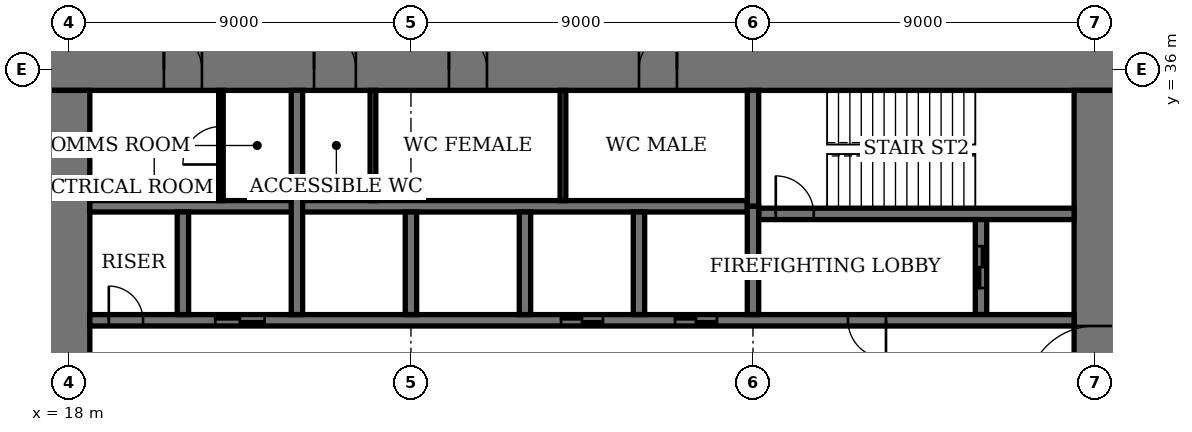
"""IFC4 building model, lengths in metres.
Left out: names, types, materials, properties, quantities, classifications, styles, units other than length and angle.
Written with IfcOpenShell. Run it as: python <this file> out.ifc"""

import sys

from ifc_helpers import new_model, si_unit, direction, frame, frame_2d, origin, place, context, subcontext, project, spatial, rectangle, extrude, element, fill, save


model = new_model("IFC4")
c1 = context("Model", 3, precision=1e-05, world=origin(), true_north=direction((0.0, 1.0)))
c2 = subcontext(c1, "Body", "Model", "MODEL_VIEW")
j1 = project(units=[si_unit("LENGTHUNIT", "METRE"), si_unit("PLANEANGLEUNIT", "RADIAN")], contexts=[c1])
p1 = place(None, origin())
s1 = spatial("IfcSite", under=j1, at=p1, CompositionType="ELEMENT")
p2 = place(p1, origin())
s2 = spatial("IfcBuilding", under=s1, at=p2, CompositionType="ELEMENT")
p3 = place(p2, frame((0.0, 0.0, 85.0)))
s3 = spatial("IfcBuildingStorey", under=s2, at=p3, CompositionType="ELEMENT", Elevation=85.0)
p4 = place(p3, frame((45.55, 36.0, 0.0), z_axis=(0.0, 0.0, 1.0), x_axis=(-1.0, 0.0, 0.0)))
e1 = element("IfcWall", 1, at=p4, inside=s3, PredefinedType="SHEAR", context=c2, shape_type="SweptSolid", body=[
    extrude(rectangle(XDim=28.1, YDim=1.1, at=frame_2d((14.05, 0.0))), origin(), (0.0, 0.0, 1.0), 4.0),
])
p5 = place(p4, frame((11.55, 0.0, 0.0)))
e2 = element("IfcOpeningElement", 2, at=p5, cuts=e1, PredefinedType="OPENING", context=c2, shape_type="SweptSolid", body=[
    extrude(rectangle(XDim=1.0, YDim=2.4, at=frame_2d((0.5, 1.2))), frame((0.0, 0.56, 0.0), z_axis=(0.0, -1.0, 0.0), x_axis=(1.0, 0.0, 0.0)), (0.0, 0.0, 1.0), 1.12),
])
p6 = place(p4, frame((16.55, 0.0, 0.0)))
e3 = element("IfcOpeningElement", 3, at=p6, cuts=e1, PredefinedType="OPENING", context=c2, shape_type="SweptSolid", body=[
    extrude(rectangle(XDim=1.0, YDim=2.4, at=frame_2d((0.5, 1.2))), frame((0.0, 0.56, 0.0), z_axis=(0.0, -1.0, 0.0), x_axis=(1.0, 0.0, 0.0)), (0.0, 0.0, 1.0), 1.12),
])
p7 = place(p4, frame((20.0, 0.0, 0.0)))
e4 = element("IfcOpeningElement", 4, at=p7, cuts=e1, PredefinedType="OPENING", context=c2, shape_type="SweptSolid", body=[
    extrude(rectangle(XDim=1.1, YDim=2.4, at=frame_2d((0.55, 1.2))), frame((0.0, 0.56, 0.0), z_axis=(0.0, -1.0, 0.0), x_axis=(1.0, 0.0, 0.0)), (0.0, 0.0, 1.0), 1.12),
])
p8 = place(p4, frame((24.05, 0.0, 0.0)))
e5 = element("IfcOpeningElement", 5, at=p8, cuts=e1, PredefinedType="OPENING", context=c2, shape_type="SweptSolid", body=[
    extrude(rectangle(XDim=1.0, YDim=2.4, at=frame_2d((0.5, 1.2))), frame((0.0, 0.56, 0.0), z_axis=(0.0, -1.0, 0.0), x_axis=(1.0, 0.0, 0.0)), (0.0, 0.0, 1.0), 1.12),
])
p9 = place(p3, frame((18.0, 35.45, 0.0), z_axis=(0.0, 0.0, 1.0), x_axis=(0.0, -1.0, 0.0)))
e6 = element("IfcWall", 6, at=p9, inside=s3, PredefinedType="SHEAR", context=c2, shape_type="SweptSolid", body=[
    extrude(rectangle(XDim=16.9, YDim=1.1, at=frame_2d((8.45, 0.0))), origin(), (0.0, 0.0, 1.0), 4.0),
])
p10 = place(p9, frame((8.9, 0.0, 0.0)))
e7 = element("IfcOpeningElement", 7, at=p10, cuts=e6, PredefinedType="OPENING", context=c2, shape_type="SweptSolid", body=[
    extrude(rectangle(XDim=1.8, YDim=2.4, at=frame_2d((0.9, 1.2))), frame((0.0, 0.56, 0.0), z_axis=(0.0, -1.0, 0.0), x_axis=(1.0, 0.0, 0.0)), (0.0, 0.0, 1.0), 1.12),
])
p11 = place(p3, frame((45.0, 18.55, 0.0), z_axis=(0.0, 0.0, 1.0), x_axis=(0.0, 1.0, 0.0)))
e8 = element("IfcWall", 8, at=p11, inside=s3, PredefinedType="SHEAR", context=c2, shape_type="SweptSolid", body=[
    extrude(rectangle(XDim=16.9, YDim=1.1, at=frame_2d((8.45, 0.0))), origin(), (0.0, 0.0, 1.0), 4.0),
])
p12 = place(p11, frame((8.9, 0.0, 0.0)))
e9 = element("IfcOpeningElement", 9, at=p12, cuts=e8, PredefinedType="OPENING", context=c2, shape_type="SweptSolid", body=[
    extrude(rectangle(XDim=1.8, YDim=2.4, at=frame_2d((0.9, 1.2))), frame((0.0, 0.56, 0.0), z_axis=(0.0, -1.0, 0.0), x_axis=(1.0, 0.0, 0.0)), (0.0, 0.0, 1.0), 1.12),
])
p13 = place(p3, frame((36.15, 32.2, 0.0), z_axis=(0.0, 0.0, 1.0), x_axis=(1.0, 0.0, 0.0)))
e10 = element("IfcWall", 10, at=p13, inside=s3, PredefinedType="SHEAR", context=c2, shape_type="SweptSolid", body=[
    extrude(rectangle(XDim=8.3, YDim=0.3, at=frame_2d((4.15, 0.0))), origin(), (0.0, 0.0, 1.0), 4.0),
])
p14 = place(p13, frame((0.45, 0.0, 0.0)))
e11 = element("IfcOpeningElement", 11, at=p14, cuts=e10, PredefinedType="OPENING", context=c2, shape_type="SweptSolid", body=[
    extrude(rectangle(XDim=1.0, YDim=2.4, at=frame_2d((0.5, 1.2))), frame((0.0, 0.16, 0.0), z_axis=(0.0, -1.0, 0.0), x_axis=(1.0, 0.0, 0.0)), (0.0, 0.0, 1.0), 0.32),
])
p15 = place(p3, frame((36.0, 32.4, 0.0), z_axis=(0.0, 0.0, 1.0), x_axis=(0.0, 1.0, 0.0)))
e12 = element("IfcWall", 12, at=p15, inside=s3, PredefinedType="SHEAR", context=c2, shape_type="SweptSolid", body=[
    extrude(rectangle(XDim=3.05, YDim=0.3, at=frame_2d((1.525, 0.0))), origin(), (0.0, 0.0, 1.0), 4.0),
])
p16 = place(p3, frame((42.0, 29.55, 0.0), z_axis=(0.0, 0.0, 1.0), x_axis=(0.0, 1.0, 0.0)))
e13 = element("IfcWall", 13, at=p16, inside=s3, PredefinedType="SHEAR", context=c2, shape_type="SweptSolid", body=[
    extrude(rectangle(XDim=2.5, YDim=0.3, at=frame_2d((1.25, 0.0))), origin(), (0.0, 0.0, 1.0), 4.0),
])
p17 = place(p16, frame((0.7, 0.0, 0.0)))
e14 = element("IfcOpeningElement", 14, at=p17, cuts=e13, PredefinedType="OPENING", context=c2, shape_type="SweptSolid", body=[
    extrude(rectangle(XDim=1.1, YDim=2.4, at=frame_2d((0.55, 1.2))), frame((0.0, 0.16, 0.0), z_axis=(0.0, -1.0, 0.0), x_axis=(1.0, 0.0, 0.0)), (0.0, 0.0, 1.0), 0.32),
])
p18 = place(p3, frame((18.55, 29.4, 0.0), z_axis=(0.0, 0.0, 1.0), x_axis=(1.0, 0.0, 0.0)))
e15 = element("IfcWall", 15, at=p18, inside=s3, PredefinedType="SHEAR", context=c2, shape_type="SweptSolid", body=[
    extrude(rectangle(XDim=25.9, YDim=0.3, at=frame_2d((12.95, 0.0))), origin(), (0.0, 0.0, 1.0), 4.0),
])
p19 = place(p18, frame((19.95, 0.0, 0.0)))
e16 = element("IfcOpeningElement", 16, at=p19, cuts=e15, PredefinedType="OPENING", context=c2, shape_type="SweptSolid", body=[
    extrude(rectangle(XDim=1.0, YDim=2.4, at=frame_2d((0.5, 1.2))), frame((0.0, 0.16, 0.0), z_axis=(0.0, -1.0, 0.0), x_axis=(1.0, 0.0, 0.0)), (0.0, 0.0, 1.0), 0.32),
])
p20 = place(p18, frame((0.5, 0.0, 0.0)))
e17 = element("IfcOpeningElement", 17, at=p20, cuts=e15, PredefinedType="OPENING", context=c2, shape_type="SweptSolid", body=[
    extrude(rectangle(XDim=0.9, YDim=2.1, at=frame_2d((0.45, 1.05))), frame((0.0, 0.16, 0.0), z_axis=(0.0, -1.0, 0.0), x_axis=(1.0, 0.0, 0.0)), (0.0, 0.0, 1.0), 0.32),
])
p21 = place(p18, frame((15.4, 0.0, 0.0)))
e18 = element("IfcOpeningElement", 18, at=p21, cuts=e15, PredefinedType="OPENING", context=c2, shape_type="SweptSolid", body=[
    extrude(rectangle(XDim=1.1, YDim=2.4, at=frame_2d((0.55, 1.2))), frame((0.0, 0.16, 0.0), z_axis=(0.0, -1.0, 0.0), x_axis=(1.0, 0.0, 0.0)), (0.0, 0.0, 1.0), 0.32),
])
p22 = place(p18, frame((12.4, 0.0, 0.0)))
e19 = element("IfcOpeningElement", 19, at=p22, cuts=e15, PredefinedType="OPENING", context=c2, shape_type="SweptSolid", body=[
    extrude(rectangle(XDim=1.1, YDim=2.4, at=frame_2d((0.55, 1.2))), frame((0.0, 0.16, 0.0), z_axis=(0.0, -1.0, 0.0), x_axis=(1.0, 0.0, 0.0)), (0.0, 0.0, 1.0), 0.32),
])
p23 = place(p18, frame((3.3, 0.0, 0.0)))
e20 = element("IfcOpeningElement", 20, at=p23, cuts=e15, PredefinedType="OPENING", context=c2, shape_type="SweptSolid", body=[
    extrude(rectangle(XDim=1.3, YDim=2.4, at=frame_2d((0.65, 1.2))), frame((0.0, 0.16, 0.0), z_axis=(0.0, -1.0, 0.0), x_axis=(1.0, 0.0, 0.0)), (0.0, 0.0, 1.0), 0.32),
])
p24 = place(p3, frame((18.55, 32.4, 0.0), z_axis=(0.0, 0.0, 1.0), x_axis=(1.0, 0.0, 0.0)))
e21 = element("IfcWall", 21, at=p24, inside=s3, PredefinedType="SHEAR", context=c2, shape_type="SweptSolid", body=[
    extrude(rectangle(XDim=17.3, YDim=0.3, at=frame_2d((8.65, 0.0))), origin(), (0.0, 0.0, 1.0), 4.0),
])
for number, where, z_axis, x_axis in (
    (22, (33.0, 29.55, 0.0), (0.0, 0.0, 1.0), (0.0, 1.0, 0.0)),
    (23, (30.0, 29.55, 0.0), (0.0, 0.0, 1.0), (0.0, 1.0, 0.0)),
    (24, (27.0, 29.55, 0.0), (0.0, 0.0, 1.0), (0.0, 1.0, 0.0)),
):
    element("IfcWall", number, at=place(p3, frame(where, z_axis=z_axis, x_axis=x_axis)), inside=s3, PredefinedType="SHEAR", context=c2, shape_type="SweptSolid", body=[
        extrude(rectangle(XDim=2.7, YDim=0.3, at=frame_2d((1.35, 0.0))), origin(), (0.0, 0.0, 1.0), 4.0),
    ])
p25 = place(p3, frame((24.0, 29.55, 0.0), z_axis=(0.0, 0.0, 1.0), x_axis=(0.0, 1.0, 0.0)))
e25 = element("IfcWall", 25, at=p25, inside=s3, PredefinedType="SHEAR", context=c2, shape_type="SweptSolid", body=[
    extrude(rectangle(XDim=5.9, YDim=0.3, at=frame_2d((2.95, 0.0))), origin(), (0.0, 0.0, 1.0), 4.0),
])
p26 = place(p3, frame((21.0, 29.55, 0.0), z_axis=(0.0, 0.0, 1.0), x_axis=(0.0, 1.0, 0.0)))
e26 = element("IfcWall", 26, at=p26, inside=s3, PredefinedType="SHEAR", context=c2, shape_type="SweptSolid", body=[
    extrude(rectangle(XDim=2.7, YDim=0.3, at=frame_2d((1.35, 0.0))), origin(), (0.0, 0.0, 1.0), 4.0),
])
p27 = place(p3, frame((36.0, 29.55, 0.0), z_axis=(0.0, 0.0, 1.0), x_axis=(0.0, 1.0, 0.0)))
e27 = element("IfcWall", 27, at=p27, inside=s3, PredefinedType="SHEAR", context=c2, shape_type="SweptSolid", body=[
    extrude(rectangle(XDim=2.85, YDim=0.3, at=frame_2d((1.425, 0.0))), origin(), (0.0, 0.0, 1.0), 4.0),
])
for number, where, z_axis, x_axis in (
    (28, (31.0, 32.55, 0.0), (0.0, 0.0, 1.0), (0.0, 1.0, 0.0)),
    (29, (26.0, 32.55, 0.0), (0.0, 0.0, 1.0), (0.0, 1.0, 0.0)),
):
    element("IfcWall", number, at=place(p3, frame(where, z_axis=z_axis, x_axis=x_axis)), inside=s3, PredefinedType="PARTITIONING", context=c2, shape_type="SweptSolid", body=[
        extrude(rectangle(XDim=2.9, YDim=0.15, at=frame_2d((1.45, 0.0))), origin(), (0.0, 0.0, 1.0), 3.75),
    ])
p28 = place(p3, frame((22.0, 32.55, 0.0), z_axis=(0.0, 0.0, 1.0), x_axis=(0.0, 1.0, 0.0)))
e30 = element("IfcWall", 30, at=p28, inside=s3, PredefinedType="PARTITIONING", context=c2, shape_type="SweptSolid", body=[
    extrude(rectangle(XDim=2.9, YDim=0.12, at=frame_2d((1.45, 0.0))), origin(), (0.0, 0.0, 1.0), 3.75),
])
p29 = place(p28, frame((0.95, 0.0, 0.0)))
e31 = element("IfcOpeningElement", 31, at=p29, cuts=e30, PredefinedType="OPENING", context=c2, shape_type="SweptSolid", body=[
    extrude(rectangle(XDim=1.0, YDim=2.4, at=frame_2d((0.5, 1.2))), frame((0.0, 0.07, 0.0), z_axis=(0.0, -1.0, 0.0), x_axis=(1.0, 0.0, 0.0)), (0.0, 0.0, 1.0), 0.14),
])
p30 = place(p12, origin())
e32 = element("IfcDoor", 32, at=p30, inside=s3, OperationType="DOUBLE_DOOR_DOUBLE_SWING", PredefinedType="DOOR", context=c2, shape_type="SweptSolid", body=[
    extrude(rectangle(XDim=1.8, YDim=2.4, at=frame_2d((0.9, 1.2))), frame((0.0, 0.03, 0.0), z_axis=(0.0, -1.0, 0.0), x_axis=(1.0, 0.0, 0.0)), (0.0, 0.0, 1.0), 0.06),
    extrude(rectangle(XDim=0.04, YDim=2.4, at=frame_2d((0.02, 1.2))), frame((0.0, 0.55, 0.0), z_axis=(0.0, -1.0, 0.0), x_axis=(1.0, 0.0, 0.0)), (0.0, 0.0, 1.0), 1.1),
    extrude(rectangle(XDim=0.04, YDim=2.4, at=frame_2d((1.78, 1.2))), frame((0.0, 0.55, 0.0), z_axis=(0.0, -1.0, 0.0), x_axis=(1.0, 0.0, 0.0)), (0.0, 0.0, 1.0), 1.1),
    extrude(rectangle(XDim=1.8, YDim=0.04, at=frame_2d((0.9, 2.38))), frame((0.0, 0.55, 0.0), z_axis=(0.0, -1.0, 0.0), x_axis=(1.0, 0.0, 0.0)), (0.0, 0.0, 1.0), 1.1),
])
fill(e9, e32)
p31 = place(p5, origin())
e33 = element("IfcDoor", 33, at=p31, inside=s3, OperationType="SINGLE_SWING_LEFT", PredefinedType="DOOR", context=c2, shape_type="SweptSolid", body=[
    extrude(rectangle(XDim=1.0, YDim=2.4, at=frame_2d((0.5, 1.2))), frame((0.0, 0.025, 0.0), z_axis=(0.0, -1.0, 0.0), x_axis=(1.0, 0.0, 0.0)), (0.0, 0.0, 1.0), 0.05),
    extrude(rectangle(XDim=0.04, YDim=2.4, at=frame_2d((0.02, 1.2))), frame((0.0, 0.4, 0.0), z_axis=(0.0, -1.0, 0.0), x_axis=(1.0, 0.0, 0.0)), (0.0, 0.0, 1.0), 0.8),
    extrude(rectangle(XDim=0.04, YDim=2.4, at=frame_2d((0.98, 1.2))), frame((0.0, 0.4, 0.0), z_axis=(0.0, -1.0, 0.0), x_axis=(1.0, 0.0, 0.0)), (0.0, 0.0, 1.0), 0.8),
    extrude(rectangle(XDim=1.0, YDim=0.04, at=frame_2d((0.5, 2.38))), frame((0.0, 0.4, 0.0), z_axis=(0.0, -1.0, 0.0), x_axis=(1.0, 0.0, 0.0)), (0.0, 0.0, 1.0), 0.8),
])
fill(e2, e33)
p32 = place(p6, origin())
e34 = element("IfcDoor", 34, at=p32, inside=s3, OperationType="SINGLE_SWING_RIGHT", PredefinedType="DOOR", context=c2, shape_type="SweptSolid", body=[
    extrude(rectangle(XDim=1.0, YDim=2.4, at=frame_2d((0.5, 1.2))), frame((0.0, 0.025, 0.0), z_axis=(0.0, -1.0, 0.0), x_axis=(1.0, 0.0, 0.0)), (0.0, 0.0, 1.0), 0.05),
    extrude(rectangle(XDim=0.04, YDim=2.4, at=frame_2d((0.02, 1.2))), frame((0.0, 0.4, 0.0), z_axis=(0.0, -1.0, 0.0), x_axis=(1.0, 0.0, 0.0)), (0.0, 0.0, 1.0), 0.8),
    extrude(rectangle(XDim=0.04, YDim=2.4, at=frame_2d((0.98, 1.2))), frame((0.0, 0.4, 0.0), z_axis=(0.0, -1.0, 0.0), x_axis=(1.0, 0.0, 0.0)), (0.0, 0.0, 1.0), 0.8),
    extrude(rectangle(XDim=1.0, YDim=0.04, at=frame_2d((0.5, 2.38))), frame((0.0, 0.4, 0.0), z_axis=(0.0, -1.0, 0.0), x_axis=(1.0, 0.0, 0.0)), (0.0, 0.0, 1.0), 0.8),
])
fill(e3, e34)
p33 = place(p7, origin())
e35 = element("IfcDoor", 35, at=p33, inside=s3, OperationType="SINGLE_SWING_RIGHT", PredefinedType="DOOR", context=c2, shape_type="SweptSolid", body=[
    extrude(rectangle(XDim=1.1, YDim=2.4, at=frame_2d((0.55, 1.2))), frame((0.0, 0.025, 0.0), z_axis=(0.0, -1.0, 0.0), x_axis=(1.0, 0.0, 0.0)), (0.0, 0.0, 1.0), 0.05),
    extrude(rectangle(XDim=0.04, YDim=2.4, at=frame_2d((0.02, 1.2))), frame((0.0, 0.44, 0.0), z_axis=(0.0, -1.0, 0.0), x_axis=(1.0, 0.0, 0.0)), (0.0, 0.0, 1.0), 0.88),
    extrude(rectangle(XDim=0.04, YDim=2.4, at=frame_2d((1.08, 1.2))), frame((0.0, 0.44, 0.0), z_axis=(0.0, -1.0, 0.0), x_axis=(1.0, 0.0, 0.0)), (0.0, 0.0, 1.0), 0.88),
    extrude(rectangle(XDim=1.1, YDim=0.04, at=frame_2d((0.55, 2.38))), frame((0.0, 0.44, 0.0), z_axis=(0.0, -1.0, 0.0), x_axis=(1.0, 0.0, 0.0)), (0.0, 0.0, 1.0), 0.88),
])
fill(e4, e35)
p34 = place(p8, origin())
e36 = element("IfcDoor", 36, at=p34, inside=s3, OperationType="SINGLE_SWING_RIGHT", PredefinedType="DOOR", context=c2, shape_type="SweptSolid", body=[
    extrude(rectangle(XDim=1.0, YDim=2.4, at=frame_2d((0.5, 1.2))), frame((0.0, 0.025, 0.0), z_axis=(0.0, -1.0, 0.0), x_axis=(1.0, 0.0, 0.0)), (0.0, 0.0, 1.0), 0.05),
    extrude(rectangle(XDim=0.04, YDim=2.4, at=frame_2d((0.02, 1.2))), frame((0.0, 0.4, 0.0), z_axis=(0.0, -1.0, 0.0), x_axis=(1.0, 0.0, 0.0)), (0.0, 0.0, 1.0), 0.8),
    extrude(rectangle(XDim=0.04, YDim=2.4, at=frame_2d((0.98, 1.2))), frame((0.0, 0.4, 0.0), z_axis=(0.0, -1.0, 0.0), x_axis=(1.0, 0.0, 0.0)), (0.0, 0.0, 1.0), 0.8),
    extrude(rectangle(XDim=1.0, YDim=0.04, at=frame_2d((0.5, 2.38))), frame((0.0, 0.4, 0.0), z_axis=(0.0, -1.0, 0.0), x_axis=(1.0, 0.0, 0.0)), (0.0, 0.0, 1.0), 0.8),
])
fill(e5, e36)
p35 = place(p14, origin())
e37 = element("IfcDoor", 37, at=p35, inside=s3, OperationType="SINGLE_SWING_RIGHT", PredefinedType="DOOR", context=c2, shape_type="SweptSolid", body=[
    extrude(rectangle(XDim=1.0, YDim=2.4, at=frame_2d((0.5, 1.2))), frame((0.0, 0.03, 0.0), z_axis=(0.0, -1.0, 0.0), x_axis=(1.0, 0.0, 0.0)), (0.0, 0.0, 1.0), 0.06),
])
fill(e11, e37)
p36 = place(p19, origin())
e38 = element("IfcDoor", 38, at=p36, inside=s3, OperationType="SINGLE_SWING_RIGHT", PredefinedType="DOOR", context=c2, shape_type="SweptSolid", body=[
    extrude(rectangle(XDim=1.0, YDim=2.4, at=frame_2d((0.5, 1.2))), frame((0.0, 0.03, 0.0), z_axis=(0.0, -1.0, 0.0), x_axis=(1.0, 0.0, 0.0)), (0.0, 0.0, 1.0), 0.06),
])
fill(e16, e38)
p37 = place(p20, origin())
e39 = element("IfcDoor", 39, at=p37, inside=s3, OperationType="SINGLE_SWING_RIGHT", PredefinedType="DOOR", context=c2, shape_type="SweptSolid", body=[
    extrude(rectangle(XDim=0.9, YDim=2.1, at=frame_2d((0.45, 1.05))), frame((0.0, 0.03, 0.0), z_axis=(0.0, -1.0, 0.0), x_axis=(1.0, 0.0, 0.0)), (0.0, 0.0, 1.0), 0.06),
])
fill(e17, e39)
p38 = place(p29, origin())
e40 = element("IfcDoor", 40, at=p38, inside=s3, OperationType="SINGLE_SWING_RIGHT", PredefinedType="DOOR", context=c2, shape_type="SweptSolid", body=[
    extrude(rectangle(XDim=1.0, YDim=2.4, at=frame_2d((0.5, 1.2))), frame((0.0, 0.03, 0.0), z_axis=(0.0, -1.0, 0.0), x_axis=(1.0, 0.0, 0.0)), (0.0, 0.0, 1.0), 0.06),
])
fill(e31, e40)
p39 = place(p21, origin())
e41 = element("IfcDoor", 41, at=p39, inside=s3, OperationType="DOUBLE_DOOR_SLIDING", PredefinedType="DOOR", context=c2, shape_type="SweptSolid", body=[
    extrude(rectangle(XDim=1.1, YDim=2.4, at=frame_2d((0.55, 1.2))), frame((0.0, 0.02, 0.0), z_axis=(0.0, -1.0, 0.0), x_axis=(1.0, 0.0, 0.0)), (0.0, 0.0, 1.0), 0.04),
])
fill(e18, e41)
p40 = place(p22, origin())
e42 = element("IfcDoor", 42, at=p40, inside=s3, OperationType="DOUBLE_DOOR_SLIDING", PredefinedType="DOOR", context=c2, shape_type="SweptSolid", body=[
    extrude(rectangle(XDim=1.1, YDim=2.4, at=frame_2d((0.55, 1.2))), frame((0.0, 0.02, 0.0), z_axis=(0.0, -1.0, 0.0), x_axis=(1.0, 0.0, 0.0)), (0.0, 0.0, 1.0), 0.04),
])
fill(e19, e42)
p41 = place(p23, origin())
e43 = element("IfcDoor", 43, at=p41, inside=s3, OperationType="DOUBLE_DOOR_SLIDING", PredefinedType="DOOR", context=c2, shape_type="SweptSolid", body=[
    extrude(rectangle(XDim=1.3, YDim=2.4, at=frame_2d((0.65, 1.2))), frame((0.0, 0.02, 0.0), z_axis=(0.0, -1.0, 0.0), x_axis=(1.0, 0.0, 0.0)), (0.0, 0.0, 1.0), 0.04),
])
fill(e20, e43)
p42 = place(p17, origin())
e44 = element("IfcDoor", 44, at=p42, inside=s3, OperationType="DOUBLE_DOOR_SLIDING", PredefinedType="DOOR", context=c2, shape_type="SweptSolid", body=[
    extrude(rectangle(XDim=1.1, YDim=2.4, at=frame_2d((0.55, 1.2))), frame((0.0, 0.03, 0.0), z_axis=(0.0, -1.0, 0.0), x_axis=(1.0, 0.0, 0.0)), (0.0, 0.0, 1.0), 0.06),
])
fill(e14, e44)
save(model, sys.argv[1])
